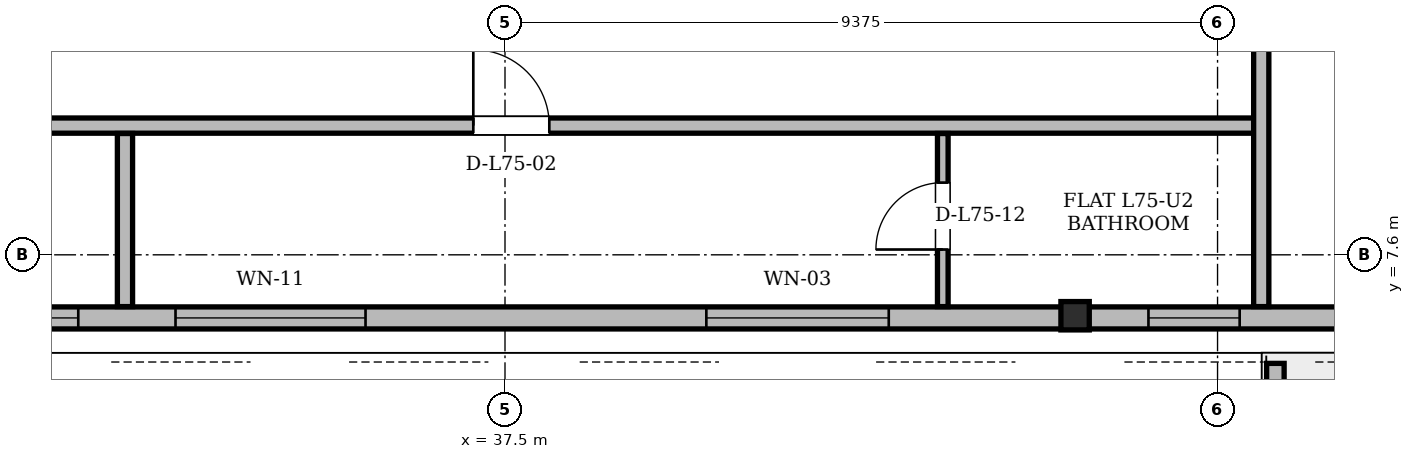
"""IFC4 building model, lengths in metres.
Left out: names, types, materials, properties, quantities, classifications, styles, units other than length and angle.
Written with IfcOpenShell. Run it as: python <this file> out.ifc"""

import sys

from ifc_helpers import new_model, si_unit, direction, frame, frame_2d, origin, origin_2d, place, context, subcontext, project, spatial, polyline, rectangle, i_section, outline, extrude, element, fill, save


model = new_model("IFC4")
c1 = context("Model", 3, precision=1e-05, world=origin(), true_north=direction((0.0, 1.0)))
c2 = subcontext(c1, "Body", "Model", "MODEL_VIEW")
j1 = project(units=[si_unit("LENGTHUNIT", "METRE"), si_unit("PLANEANGLEUNIT", "RADIAN")], contexts=[c1])
p1 = place(None, origin())
s1 = spatial("IfcSite", under=j1, at=p1, CompositionType="ELEMENT")
p2 = place(p1, origin())
s2 = spatial("IfcBuilding", under=s1, at=p2, CompositionType="ELEMENT")
p3 = place(p2, frame((0.0, 0.0, 285.0)))
s3 = spatial("IfcBuildingStorey", under=s2, at=p3, CompositionType="ELEMENT", Elevation=285.0)
p4 = place(p3, frame((44.996, 6.77, 0.004), z_axis=(0.002321235081, 0.01480571565, 0.99988769502), x_axis=(-0.987932089453, 0.154887658092, 0.0)))
e1 = element("IfcColumn", 1, at=p4, inside=s3, PredefinedType="COLUMN", context=c2, shape_type="SweptSolid", body=[
    extrude(i_section(OverallWidth=0.373, OverallDepth=0.373, WebThickness=0.016, FlangeThickness=0.026, at=origin_2d()), origin(), (0.0, 0.0, 1.0), 3.892),
])
p5 = place(p3, frame((18.76, 6.77, 0.0), z_axis=(0.0, 0.0, 1.0), x_axis=(1.0, 0.0, 0.0)))
e2 = element("IfcWall", 2, at=p5, inside=s3, PredefinedType="SOLIDWALL", context=c2, shape_type="SweptSolid", body=[
    extrude(rectangle(XDim=37.481, YDim=0.29, at=frame_2d((18.74, 0.0))), origin(), (0.0, 0.0, 1.0), 3.058),
])
p6 = place(p5, frame((8.034, 0.0, 0.0)))
e3 = element("IfcOpeningElement", 3, at=p6, cuts=e2, PredefinedType="OPENING", context=c2, shape_type="SweptSolid", body=[
    extrude(rectangle(XDim=1.5, YDim=2.2, at=frame_2d((0.75, 1.1))), frame((0.0, 0.145, 0.0), z_axis=(0.0, -1.0, 0.0), x_axis=(1.0, 0.0, 0.0)), (0.0, 0.0, 1.0), 0.29),
])
p7 = place(p5, frame((32.341, 0.0, 0.0)))
e4 = element("IfcOpeningElement", 4, at=p7, cuts=e2, PredefinedType="OPENING", context=c2, shape_type="SweptSolid", body=[
    extrude(rectangle(XDim=1.5, YDim=2.2, at=frame_2d((0.75, 1.1))), frame((0.0, 0.145, 0.0), z_axis=(0.0, -1.0, 0.0), x_axis=(1.0, 0.0, 0.0)), (0.0, 0.0, 1.0), 0.29),
])
p8 = place(p5, frame((3.864, 0.0, 0.85)))
e5 = element("IfcOpeningElement", 5, at=p8, cuts=e2, PredefinedType="OPENING", context=c2, shape_type="SweptSolid", body=[
    extrude(rectangle(XDim=1.2, YDim=1.48, at=frame_2d((0.6, 0.74))), frame((0.0, 0.145, 0.0), z_axis=(0.0, -1.0, 0.0), x_axis=(1.0, 0.0, 0.0)), (0.0, 0.0, 1.0), 0.29),
])
p9 = place(p5, frame((11.926, 0.0, 0.85)))
e6 = element("IfcOpeningElement", 6, at=p9, cuts=e2, PredefinedType="OPENING", context=c2, shape_type="SweptSolid", body=[
    extrude(rectangle(XDim=1.2, YDim=1.48, at=frame_2d((0.6, 0.74))), frame((0.0, 0.145, 0.0), z_axis=(0.0, -1.0, 0.0), x_axis=(1.0, 0.0, 0.0)), (0.0, 0.0, 1.0), 0.29),
])
p10 = place(p5, frame((0.872, 0.0, 0.85)))
e7 = element("IfcOpeningElement", 7, at=p10, cuts=e2, PredefinedType="OPENING", context=c2, shape_type="SweptSolid", body=[
    extrude(rectangle(XDim=1.2, YDim=1.48, at=frame_2d((0.6, 0.74))), frame((0.0, 0.145, 0.0), z_axis=(0.0, -1.0, 0.0), x_axis=(1.0, 0.0, 0.0)), (0.0, 0.0, 1.0), 0.29),
])
p11 = place(p5, frame((14.405, 0.0, 0.85)))
e8 = element("IfcOpeningElement", 8, at=p11, cuts=e2, PredefinedType="OPENING", context=c2, shape_type="SweptSolid", body=[
    extrude(rectangle(XDim=2.5, YDim=2.098, at=frame_2d((1.25, 1.049))), frame((0.0, 0.145, 0.0), z_axis=(0.0, -1.0, 0.0), x_axis=(1.0, 0.0, 0.0)), (0.0, 0.0, 1.0), 0.29),
])
p12 = place(p5, frame((21.389, 0.0, 0.85)))
e9 = element("IfcOpeningElement", 9, at=p12, cuts=e2, PredefinedType="OPENING", context=c2, shape_type="SweptSolid", body=[
    extrude(rectangle(XDim=2.4, YDim=1.9, at=frame_2d((1.2, 0.95))), frame((0.0, 0.145, 0.0), z_axis=(0.0, -1.0, 0.0), x_axis=(1.0, 0.0, 0.0)), (0.0, 0.0, 1.0), 0.29),
])
p13 = place(p5, frame((27.206, 0.0, 0.85)))
e10 = element("IfcOpeningElement", 10, at=p13, cuts=e2, PredefinedType="OPENING", context=c2, shape_type="SweptSolid", body=[
    extrude(rectangle(XDim=1.2, YDim=1.48, at=frame_2d((0.6, 0.74))), frame((0.0, 0.145, 0.0), z_axis=(0.0, -1.0, 0.0), x_axis=(1.0, 0.0, 0.0)), (0.0, 0.0, 1.0), 0.29),
])
p14 = place(p5, frame((29.717, 0.0, 0.85)))
e11 = element("IfcOpeningElement", 11, at=p14, cuts=e2, PredefinedType="OPENING", context=c2, shape_type="SweptSolid", body=[
    extrude(rectangle(XDim=1.2, YDim=1.48, at=frame_2d((0.6, 0.74))), frame((0.0, 0.145, 0.0), z_axis=(0.0, -1.0, 0.0), x_axis=(1.0, 0.0, 0.0)), (0.0, 0.0, 1.0), 0.29),
])
p15 = place(p5, frame((35.341, 0.0, 0.85)))
e12 = element("IfcOpeningElement", 12, at=p15, cuts=e2, PredefinedType="OPENING", context=c2, shape_type="SweptSolid", body=[
    extrude(rectangle(XDim=1.2, YDim=1.48, at=frame_2d((0.6, 0.74))), frame((0.0, 0.145, 0.0), z_axis=(0.0, -1.0, 0.0), x_axis=(1.0, 0.0, 0.0)), (0.0, 0.0, 1.0), 0.29),
])
p16 = place(p3, frame((47.636, 6.172, 0.0), z_axis=(0.0, 0.0, 1.0), x_axis=(0.0, -1.0, 0.0)))
e13 = element("IfcWall", 13, at=p16, inside=s3, PredefinedType="PARAPET", context=c2, shape_type="SweptSolid", body=[
    extrude(outline(polyline([(0.0, 0.0), (2.042, 0.0), (2.042, 1.1), (0.0, 1.32), (0.0, 0.0)])), frame((0.0, 0.115, 0.0), z_axis=(0.0, -1.0, 0.0), x_axis=(1.0, 0.0, 0.0)), (0.0, 0.0, 1.0), 0.23),
])
p17 = place(p3, frame((25.6, 9.3, 0.0), z_axis=(0.0, 0.0, 1.0), x_axis=(1.0, 0.0, 0.0)))
e14 = element("IfcWall", 14, at=p17, inside=s3, PredefinedType="PARTITIONING", context=c2, shape_type="SweptSolid", body=[
    extrude(rectangle(XDim=21.85, YDim=0.2, at=frame_2d((10.925, 0.0))), origin(), (0.0, 0.0, 1.0), 3.68),
])
p18 = place(p17, frame((2.375, 0.0, 0.0)))
e15 = element("IfcOpeningElement", 15, at=p18, cuts=e14, PredefinedType="OPENING", context=c2, shape_type="SweptSolid", body=[
    extrude(rectangle(XDim=1.0, YDim=2.18, at=frame_2d((0.5, 1.09))), frame((0.0, 0.1, 0.0), z_axis=(0.0, -1.0, 0.0), x_axis=(1.0, 0.0, 0.0)), (0.0, 0.0, 1.0), 0.2),
])
p19 = place(p17, frame((11.483, 0.0, 0.0)))
e16 = element("IfcOpeningElement", 16, at=p19, cuts=e14, PredefinedType="OPENING", context=c2, shape_type="SweptSolid", body=[
    extrude(rectangle(XDim=1.0, YDim=2.18, at=frame_2d((0.5, 1.09))), frame((0.0, 0.1, 0.0), z_axis=(0.0, -1.0, 0.0), x_axis=(1.0, 0.0, 0.0)), (0.0, 0.0, 1.0), 0.2),
])
p20 = place(p3, frame((32.5, 6.919, 0.0), z_axis=(0.0, 0.0, 1.0), x_axis=(0.0, 1.0, 0.0)))
e17 = element("IfcWall", 17, at=p20, inside=s3, PredefinedType="PARTITIONING", context=c2, shape_type="SweptSolid", body=[
    extrude(rectangle(XDim=2.277, YDim=0.2, at=frame_2d((1.139, 0.0))), origin(), (0.0, 0.0, 1.0), 3.68),
])
p21 = place(p3, frame((43.26, 6.919, 0.0), z_axis=(0.0, 0.0, 1.0), x_axis=(0.0, 1.0, 0.0)))
e18 = element("IfcWall", 18, at=p21, inside=s3, PredefinedType="PARTITIONING", context=c2, shape_type="SweptSolid", body=[
    extrude(rectangle(XDim=2.277, YDim=0.14, at=frame_2d((1.139, 0.0))), origin(), (0.0, 0.0, 1.0), 3.68),
])
p22 = place(p21, frame((0.751, 0.0, 0.0)))
e19 = element("IfcOpeningElement", 19, at=p22, cuts=e18, PredefinedType="OPENING", context=c2, shape_type="SweptSolid", body=[
    extrude(rectangle(XDim=0.88, YDim=2.08, at=frame_2d((0.44, 1.04))), frame((0.0, 0.07, 0.0), z_axis=(0.0, -1.0, 0.0), x_axis=(1.0, 0.0, 0.0)), (0.0, 0.0, 1.0), 0.14),
])
p23 = place(p3, frame((47.45, 6.919, 0.0), z_axis=(0.0, 0.0, 1.0), x_axis=(0.0, 1.0, 0.0)))
e20 = element("IfcWall", 20, at=p23, inside=s3, PredefinedType="PARTITIONING", context=c2, shape_type="SweptSolid", body=[
    extrude(rectangle(XDim=22.31, YDim=0.2, at=frame_2d((11.155, 0.0))), origin(), (0.0, 0.0, 1.0), 3.058),
])
p24 = place(p23, frame((10.142, 0.0, 0.0)))
e21 = element("IfcOpeningElement", 21, at=p24, cuts=e20, PredefinedType="OPENING", context=c2, shape_type="SweptSolid", body=[
    extrude(rectangle(XDim=1.0, YDim=2.18, at=frame_2d((0.5, 1.09))), frame((0.0, 0.1, 0.0), z_axis=(0.0, -1.0, 0.0), x_axis=(1.0, 0.0, 0.0)), (0.0, 0.0, 1.0), 0.2),
])
p25 = place(p9, origin())
e22 = element("IfcWindow", 22, at=p25, inside=s3, PartitioningType="SINGLE_PANEL", PredefinedType="WINDOW", context=c2, shape_type="SweptSolid", body=[
    extrude(rectangle(XDim=1.2, YDim=1.48, at=frame_2d((0.6, 0.74))), frame((0.0, 0.03, 0.0), z_axis=(0.0, -1.0, 0.0), x_axis=(1.0, 0.0, 0.0)), (0.0, 0.0, 1.0), 0.06),
])
fill(e6, e22)
p26 = place(p11, origin())
e23 = element("IfcWindow", 23, at=p26, inside=s3, PartitioningType="SINGLE_PANEL", PredefinedType="WINDOW", context=c2, shape_type="SweptSolid", body=[
    extrude(rectangle(XDim=2.5, YDim=2.098, at=frame_2d((1.25, 1.049))), frame((0.0, 0.03, 0.0), z_axis=(0.0, -1.0, 0.0), x_axis=(1.0, 0.0, 0.0)), (0.0, 0.0, 1.0), 0.06),
])
fill(e8, e23)
p27 = place(p12, origin())
e24 = element("IfcWindow", 24, at=p27, inside=s3, PartitioningType="SINGLE_PANEL", PredefinedType="WINDOW", context=c2, shape_type="SweptSolid", body=[
    extrude(rectangle(XDim=2.4, YDim=1.9, at=frame_2d((1.2, 0.95))), frame((0.0, 0.03, 0.0), z_axis=(0.0, -1.0, 0.0), x_axis=(1.0, 0.0, 0.0)), (0.0, 0.0, 1.0), 0.06),
])
fill(e9, e24)
p28 = place(p13, origin())
e25 = element("IfcWindow", 25, at=p28, inside=s3, PartitioningType="SINGLE_PANEL", PredefinedType="WINDOW", context=c2, shape_type="SweptSolid", body=[
    extrude(rectangle(XDim=1.2, YDim=1.48, at=frame_2d((0.6, 0.74))), frame((0.0, 0.03, 0.0), z_axis=(0.0, -1.0, 0.0), x_axis=(1.0, 0.0, 0.0)), (0.0, 0.0, 1.0), 0.06),
])
fill(e10, e25)
p29 = place(p19, origin())
e26 = element("IfcDoor", 26, at=p29, inside=s3, OperationType="SINGLE_SWING_LEFT", PredefinedType="DOOR", context=c2, shape_type="SweptSolid", body=[
    extrude(rectangle(XDim=1.0, YDim=2.18, at=frame_2d((0.5, 1.09))), frame((0.0, 0.025, 0.0), z_axis=(0.0, -1.0, 0.0), x_axis=(1.0, 0.0, 0.0)), (0.0, 0.0, 1.0), 0.05),
])
fill(e16, e26)
p30 = place(p22, origin())
e27 = element("IfcDoor", 27, at=p30, inside=s3, OperationType="SINGLE_SWING_LEFT", PredefinedType="DOOR", context=c2, shape_type="SweptSolid", body=[
    extrude(rectangle(XDim=0.88, YDim=2.08, at=frame_2d((0.44, 1.04))), frame((0.0, 0.025, 0.0), z_axis=(0.0, -1.0, 0.0), x_axis=(1.0, 0.0, 0.0)), (0.0, 0.0, 1.0), 0.05),
])
fill(e19, e27)
save(model, sys.argv[1])
